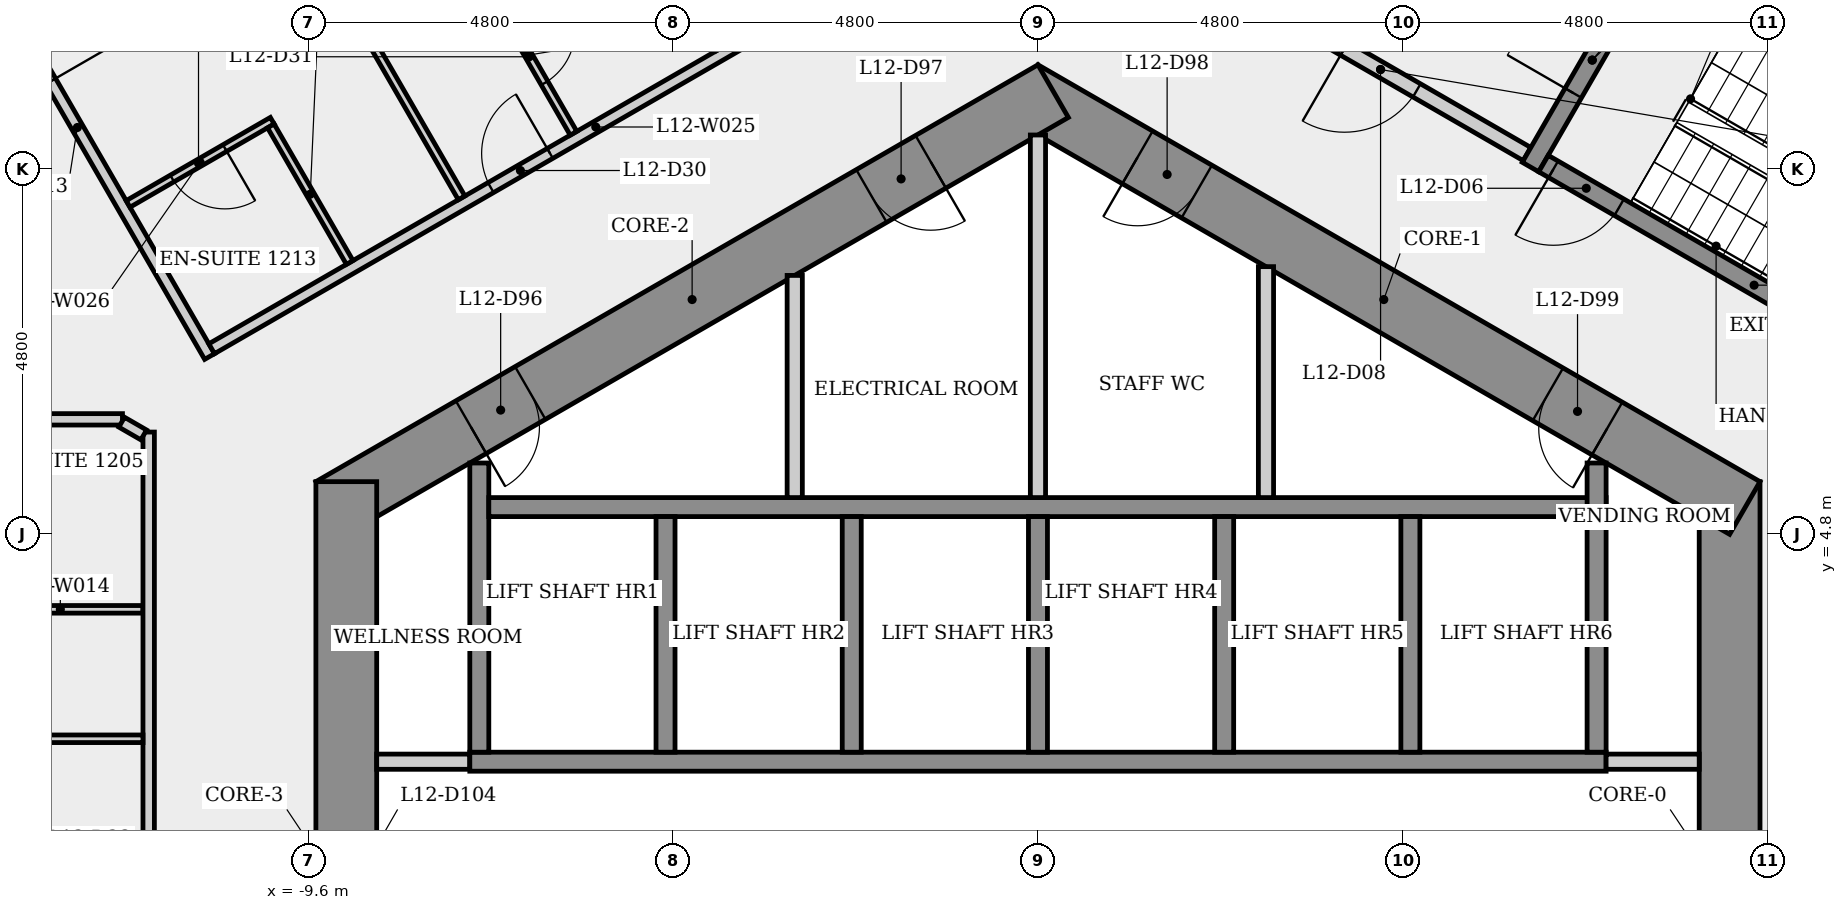
"""IFC4 building model, lengths in metres.
Left out: names, types, materials, properties, quantities, classifications, styles, units other than length and angle.
Written with IfcOpenShell. Run it as: python <this file> out.ifc"""

import sys

from ifc_helpers import new_model, si_unit, direction, frame, frame_2d, origin, place, context, subcontext, project, spatial, rectangle, extrude, element, fill, save


model = new_model("IFC4")
c1 = context("Model", 3, precision=1e-05, world=origin(), true_north=direction((0.0, 1.0)))
c2 = subcontext(c1, "Body", "Model", "MODEL_VIEW")
j1 = project(units=[si_unit("LENGTHUNIT", "METRE"), si_unit("PLANEANGLEUNIT", "RADIAN")], contexts=[c1])
p1 = place(None, origin())
s1 = spatial("IfcSite", under=j1, at=p1, CompositionType="ELEMENT")
p2 = place(p1, origin())
s2 = spatial("IfcBuilding", under=s1, at=p2, CompositionType="ELEMENT")
p3 = place(p2, frame((0.0, 0.0, 49.3)))
s3 = spatial("IfcBuildingStorey", under=s2, at=p3, CompositionType="ELEMENT", Elevation=49.3)
p4 = place(p3, frame((9.1, -5.485, 0.0), z_axis=(0.0, 0.0, 1.0), x_axis=(0.0, 1.0, 0.0)))
e1 = element("IfcWall", 1, at=p4, inside=s3, PredefinedType="SHEAR", context=c2, shape_type="SweptSolid", body=[
    extrude(rectangle(XDim=10.97, YDim=0.8, at=frame_2d((5.485, 0.0))), origin(), (0.0, 0.0, 1.0), 3.4),
])
p5 = place(p4, frame((4.685, 0.0, 0.0)))
e2 = element("IfcOpeningElement", 2, at=p5, cuts=e1, PredefinedType="OPENING", context=c2, shape_type="SweptSolid", body=[
    extrude(rectangle(XDim=1.6, YDim=2.1, at=frame_2d((0.8, 1.05))), frame((0.0, 0.41, 0.0), z_axis=(0.0, -1.0, 0.0), x_axis=(1.0, 0.0, 0.0)), (0.0, 0.0, 1.0), 0.82),
])
p6 = place(p3, frame((9.3, 5.138, 0.0), z_axis=(0.0, 0.0, 1.0), x_axis=(-0.866023993627, 0.500002442456, 0.0)))
e3 = element("IfcWall", 3, at=p6, inside=s3, PredefinedType="SHEAR", context=c2, shape_type="SweptSolid", body=[
    extrude(rectangle(XDim=10.97, YDim=0.8, at=frame_2d((5.485, 0.0))), origin(), (0.0, 0.0, 1.0), 3.4),
])
p7 = place(p6, frame((8.326, 0.0, 0.0)))
e4 = element("IfcOpeningElement", 4, at=p7, cuts=e3, PredefinedType="OPENING", context=c2, shape_type="SweptSolid", body=[
    extrude(rectangle(XDim=0.9, YDim=2.1, at=frame_2d((0.45, 1.05))), frame((0.0, 0.41, 0.0), z_axis=(0.0, -1.0, 0.0), x_axis=(1.0, 0.0, 0.0)), (0.0, 0.0, 1.0), 0.82),
])
p8 = place(p6, frame((2.091, 0.0, 0.0)))
e5 = element("IfcOpeningElement", 5, at=p8, cuts=e3, PredefinedType="OPENING", context=c2, shape_type="SweptSolid", body=[
    extrude(rectangle(XDim=0.9, YDim=2.1, at=frame_2d((0.45, 1.05))), frame((0.0, 0.41, 0.0), z_axis=(0.0, -1.0, 0.0), x_axis=(1.0, 0.0, 0.0)), (0.0, 0.0, 1.0), 0.82),
])
p9 = place(p3, frame((0.2, 10.623, 0.0), z_axis=(0.0, 0.0, 1.0), x_axis=(-0.866023993627, -0.500002442456, 0.0)))
e6 = element("IfcWall", 6, at=p9, inside=s3, PredefinedType="SHEAR", context=c2, shape_type="SweptSolid", body=[
    extrude(rectangle(XDim=10.97, YDim=0.8, at=frame_2d((5.485, 0.0))), origin(), (0.0, 0.0, 1.0), 3.4),
])
p10 = place(p9, frame((7.944, 0.0, 0.0)))
e7 = element("IfcOpeningElement", 7, at=p10, cuts=e6, PredefinedType="OPENING", context=c2, shape_type="SweptSolid", body=[
    extrude(rectangle(XDim=0.9, YDim=2.1, at=frame_2d((0.45, 1.05))), frame((0.0, 0.41, 0.0), z_axis=(0.0, -1.0, 0.0), x_axis=(1.0, 0.0, 0.0)), (0.0, 0.0, 1.0), 0.82),
])
p11 = place(p9, frame((1.86, 0.0, 0.0)))
e8 = element("IfcOpeningElement", 8, at=p11, cuts=e6, PredefinedType="OPENING", context=c2, shape_type="SweptSolid", body=[
    extrude(rectangle(XDim=0.9, YDim=2.1, at=frame_2d((0.45, 1.05))), frame((0.0, 0.41, 0.0), z_axis=(0.0, -1.0, 0.0), x_axis=(1.0, 0.0, 0.0)), (0.0, 0.0, 1.0), 0.82),
])
p12 = place(p3, frame((-9.1, 5.485, 0.0), z_axis=(0.0, 0.0, 1.0), x_axis=(0.0, -1.0, 0.0)))
e9 = element("IfcWall", 9, at=p12, inside=s3, PredefinedType="SHEAR", context=c2, shape_type="SweptSolid", body=[
    extrude(rectangle(XDim=10.97, YDim=0.8, at=frame_2d((5.485, 0.0))), origin(), (0.0, 0.0, 1.0), 3.4),
])
p13 = place(p12, frame((4.685, 0.0, 0.0)))
e10 = element("IfcOpeningElement", 10, at=p13, cuts=e9, PredefinedType="OPENING", context=c2, shape_type="SweptSolid", body=[
    extrude(rectangle(XDim=1.6, YDim=2.1, at=frame_2d((0.8, 1.05))), frame((0.0, 0.41, 0.0), z_axis=(0.0, -1.0, 0.0), x_axis=(1.0, 0.0, 0.0)), (0.0, 0.0, 1.0), 0.82),
])
p14 = place(p3, frame((-14.378, 13.158, 0.0), z_axis=(0.0, 0.0, 1.0), x_axis=(0.499998787219, -0.866026103983, 0.0)))
e11 = element("IfcWall", 11, at=p14, inside=s3, PredefinedType="PARTITIONING", context=c2, shape_type="SweptSolid", body=[
    extrude(rectangle(XDim=6.959, YDim=0.15, at=frame_2d((3.48, 0.0))), origin(), (0.0, 0.0, 1.0), 3.05),
])
p15 = place(p14, frame((1.877, 0.0, 0.0)))
e12 = element("IfcOpeningElement", 12, at=p15, cuts=e11, PredefinedType="OPENING", context=c2, shape_type="SweptSolid", body=[
    extrude(rectangle(XDim=0.9, YDim=2.1, at=frame_2d((0.45, 1.05))), frame((0.0, 0.085, 0.0), z_axis=(0.0, -1.0, 0.0), x_axis=(1.0, 0.0, 0.0)), (0.0, 0.0, 1.0), 0.17),
])
p16 = place(p3, frame((-13.95, 3.805, 0.0), z_axis=(0.0, 0.0, 1.0), x_axis=(1.0, 0.0, 0.0)))
e13 = element("IfcWall", 13, at=p16, inside=s3, PredefinedType="PARTITIONING", context=c2, shape_type="SweptSolid", body=[
    extrude(rectangle(XDim=2.175, YDim=0.1, at=frame_2d((1.087, 0.0))), origin(), (0.0, 0.0, 1.0), 3.05),
])
p17 = place(p3, frame((-18.335, 6.305, 0.0), z_axis=(0.0, 0.0, 1.0), x_axis=(1.0, 0.0, 0.0)))
e14 = element("IfcWall", 14, at=p17, inside=s3, PredefinedType="PARTITIONING", context=c2, shape_type="SweptSolid", body=[
    extrude(rectangle(XDim=6.29, YDim=0.15, at=frame_2d((3.145, 0.0))), origin(), (0.0, 0.0, 1.0), 3.05),
])
p18 = place(p17, frame((1.753, 0.0, 0.0)))
e15 = element("IfcOpeningElement", 15, at=p18, cuts=e14, PredefinedType="OPENING", context=c2, shape_type="SweptSolid", body=[
    extrude(rectangle(XDim=0.9, YDim=2.1, at=frame_2d((0.45, 1.05))), frame((0.0, 0.085, 0.0), z_axis=(0.0, -1.0, 0.0), x_axis=(1.0, 0.0, 0.0)), (0.0, 0.0, 1.0), 0.17),
])
p19 = place(p3, frame((-11.7, 6.137, 0.0), z_axis=(0.0, 0.0, 1.0), x_axis=(0.0, -1.0, 0.0)))
e16 = element("IfcWall", 16, at=p19, inside=s3, PredefinedType="PARTITIONING", context=c2, shape_type="SweptSolid", body=[
    extrude(rectangle(XDim=12.125, YDim=0.15, at=frame_2d((6.062, 0.0))), origin(), (0.0, 0.0, 1.0), 3.05),
])
p20 = place(p19, frame((5.637, 0.0, 0.0)))
e17 = element("IfcOpeningElement", 17, at=p20, cuts=e16, PredefinedType="OPENING", context=c2, shape_type="SweptSolid", body=[
    extrude(rectangle(XDim=1.0, YDim=2.1, at=frame_2d((0.5, 1.05))), frame((0.0, 0.085, 0.0), z_axis=(0.0, -1.0, 0.0), x_axis=(1.0, 0.0, 0.0)), (0.0, 0.0, 1.0), 0.17),
])
p21 = place(p3, frame((-11.775, 2.102, 0.0), z_axis=(0.0, 0.0, 1.0), x_axis=(-1.0, 0.0, 0.0)))
e18 = element("IfcWall", 18, at=p21, inside=s3, PredefinedType="PARTITIONING", context=c2, shape_type="SweptSolid", body=[
    extrude(rectangle(XDim=8.594, YDim=0.1, at=frame_2d((4.297, 0.0))), origin(), (0.0, 0.0, 1.0), 3.05),
])
p22 = place(p3, frame((-11.765, 6.1, 0.0), z_axis=(0.0, 0.0, 1.0), x_axis=(-0.866173457785, 0.499743475223, 0.0)))
e19 = element("IfcWall", 19, at=p22, inside=s3, PredefinedType="PARTITIONING", context=c2, shape_type="SweptSolid", body=[
    extrude(rectangle(XDim=0.335, YDim=0.15, at=frame_2d((0.167, 0.0))), origin(), (0.0, 0.0, 1.0), 3.05),
])
p23 = place(p3, frame((-10.871, 7.233, 0.0), z_axis=(0.0, 0.0, 1.0), x_axis=(0.866013843593, 0.500020022305, 0.0)))
e20 = element("IfcWall", 20, at=p23, inside=s3, PredefinedType="PARTITIONING", context=c2, shape_type="SweptSolid", body=[
    extrude(rectangle(XDim=11.671, YDim=0.15, at=frame_2d((5.835, 0.0))), origin(), (0.0, 0.0, 1.0), 3.05),
])
p24 = place(p23, frame((4.24, 0.0, 0.0)))
e21 = element("IfcOpeningElement", 21, at=p24, cuts=e20, PredefinedType="OPENING", context=c2, shape_type="SweptSolid", body=[
    extrude(rectangle(XDim=0.9, YDim=2.1, at=frame_2d((0.45, 1.05))), frame((0.0, 0.085, 0.0), z_axis=(0.0, -1.0, 0.0), x_axis=(1.0, 0.0, 0.0)), (0.0, 0.0, 1.0), 0.17),
])
p25 = place(p3, frame((-10.074, 10.234, 0.0), z_axis=(0.0, 0.0, 1.0), x_axis=(-0.866074224396, -0.499915430684, 0.0)))
e22 = element("IfcWall", 22, at=p25, inside=s3, PredefinedType="PARTITIONING", context=c2, shape_type="SweptSolid", body=[
    extrude(rectangle(XDim=2.19, YDim=0.1, at=frame_2d((1.095, 0.0))), origin(), (0.0, 0.0, 1.0), 3.05),
])
p26 = place(p25, frame((0.72, 0.0, 0.0)))
e23 = element("IfcOpeningElement", 23, at=p26, cuts=e22, PredefinedType="OPENING", context=c2, shape_type="SweptSolid", body=[
    extrude(rectangle(XDim=0.8, YDim=2.1, at=frame_2d((0.4, 1.05))), frame((0.0, 0.06, 0.0), z_axis=(0.0, -1.0, 0.0), x_axis=(1.0, 0.0, 0.0)), (0.0, 0.0, 1.0), 0.12),
])
p27 = place(p3, frame((-9.055, 8.369, 0.0), z_axis=(0.0, 0.0, 1.0), x_axis=(-0.499973702503, 0.866040586119, 0.0)))
e24 = element("IfcWall", 24, at=p27, inside=s3, PredefinedType="PARTITIONING", context=c2, shape_type="SweptSolid", body=[
    extrude(rectangle(XDim=2.075, YDim=0.1, at=frame_2d((1.037, 0.0))), origin(), (0.0, 0.0, 1.0), 3.05),
])
p28 = place(p3, frame((-8.7, 1.8, 0.0), z_axis=(0.0, 0.0, 1.0), x_axis=(1.0, 0.0, 0.0)))
e25 = element("IfcWall", 25, at=p28, inside=s3, PredefinedType="PARTITIONING", context=c2, shape_type="SweptSolid", body=[
    extrude(rectangle(XDim=1.225, YDim=0.2, at=frame_2d((0.613, 0.0))), origin(), (0.0, 0.0, 1.0), 3.05),
])
p29 = place(p3, frame((-7.583, 9.219, 0.0), z_axis=(0.0, 0.0, 1.0), x_axis=(-0.499977347544, 0.866038481791, 0.0)))
e26 = element("IfcWall", 26, at=p29, inside=s3, PredefinedType="PARTITIONING", context=c2, shape_type="SweptSolid", body=[
    extrude(rectangle(XDim=9.01, YDim=0.1, at=frame_2d((4.505, 0.0))), origin(), (0.0, 0.0, 1.0), 3.05),
])
p30 = place(p3, frame((-7.475, 1.8, 0.0), z_axis=(0.0, 0.0, 1.0), x_axis=(1.0, 0.0, 0.0)))
e27 = element("IfcWall", 27, at=p30, inside=s3, PredefinedType="SHEAR", context=c2, shape_type="SweptSolid", body=[
    extrude(rectangle(XDim=14.95, YDim=0.25, at=frame_2d((7.475, 0.0))), origin(), (0.0, 0.0, 1.0), 3.05),
])
p31 = place(p3, frame((-7.35, 1.925, 0.0), z_axis=(0.0, 0.0, 1.0), x_axis=(0.0, 1.0, 0.0)))
e28 = element("IfcWall", 28, at=p31, inside=s3, PredefinedType="SHEAR", context=c2, shape_type="SweptSolid", body=[
    extrude(rectangle(XDim=3.805, YDim=0.25, at=frame_2d((1.903, 0.0))), origin(), (0.0, 0.0, 1.0), 3.05),
])
p32 = place(p3, frame((-7.225, 5.15, 0.0), z_axis=(0.0, 0.0, 1.0), x_axis=(1.0, 0.0, 0.0)))
e29 = element("IfcWall", 29, at=p32, inside=s3, PredefinedType="SHEAR", context=c2, shape_type="SweptSolid", body=[
    extrude(rectangle(XDim=14.7, YDim=0.25, at=frame_2d((7.35, 0.0))), origin(), (0.0, 0.0, 1.0), 3.05),
])
p33 = place(p3, frame((-7.298, 12.125, 0.0), z_axis=(0.0, 0.0, 1.0), x_axis=(0.499986429846, -0.866033238375, 0.0)))
e30 = element("IfcWall", 30, at=p33, inside=s3, PredefinedType="PARTITIONING", context=c2, shape_type="SweptSolid", body=[
    extrude(rectangle(XDim=2.375, YDim=0.1, at=frame_2d((1.188, 0.0))), origin(), (0.0, 0.0, 1.0), 3.05),
])
p34 = place(p33, frame((0.812, 0.0, 0.0)))
e31 = element("IfcOpeningElement", 31, at=p34, cuts=e30, PredefinedType="OPENING", context=c2, shape_type="SweptSolid", body=[
    extrude(rectangle(XDim=0.8, YDim=2.1, at=frame_2d((0.4, 1.05))), frame((0.0, 0.06, 0.0), z_axis=(0.0, -1.0, 0.0), x_axis=(1.0, 0.0, 0.0)), (0.0, 0.0, 1.0), 0.12),
])
p35 = place(p3, frame((-4.9, 5.025, 0.0), z_axis=(0.0, 0.0, 1.0), x_axis=(0.0, -1.0, 0.0)))
e32 = element("IfcWall", 32, at=p35, inside=s3, PredefinedType="SHEAR", context=c2, shape_type="SweptSolid", body=[
    extrude(rectangle(XDim=3.1, YDim=0.25, at=frame_2d((1.55, 0.0))), origin(), (0.0, 0.0, 1.0), 3.4),
])
p36 = place(p3, frame((-3.2, 8.198, 0.0), z_axis=(0.0, 0.0, 1.0), x_axis=(0.0, -1.0, 0.0)))
e33 = element("IfcWall", 33, at=p36, inside=s3, PredefinedType="PARTITIONING", context=c2, shape_type="SweptSolid", body=[
    extrude(rectangle(XDim=2.924, YDim=0.2, at=frame_2d((1.462, 0.0))), origin(), (0.0, 0.0, 1.0), 3.05),
])
for number, where, z_axis, x_axis in (
    (34, (-2.45, 5.025, 0.0), (0.0, 0.0, 1.0), (0.0, -1.0, 0.0)),
    (35, (0.0, 5.025, 0.0), (0.0, 0.0, 1.0), (0.0, -1.0, 0.0)),
):
    element("IfcWall", number, at=place(p3, frame(where, z_axis=z_axis, x_axis=x_axis)), inside=s3, PredefinedType="SHEAR", context=c2, shape_type="SweptSolid", body=[
        extrude(rectangle(XDim=3.1, YDim=0.25, at=frame_2d((1.55, 0.0))), origin(), (0.0, 0.0, 1.0), 3.4),
    ])
p37 = place(p3, frame((0.0, 10.046, 0.0), z_axis=(0.0, 0.0, 1.0), x_axis=(0.0, -1.0, 0.0)))
e36 = element("IfcWall", 36, at=p37, inside=s3, PredefinedType="PARTITIONING", context=c2, shape_type="SweptSolid", body=[
    extrude(rectangle(XDim=4.771, YDim=0.2, at=frame_2d((2.385, 0.0))), origin(), (0.0, 0.0, 1.0), 3.05),
])
p38 = place(p3, frame((2.45, 5.025, 0.0), z_axis=(0.0, 0.0, 1.0), x_axis=(0.0, -1.0, 0.0)))
e37 = element("IfcWall", 37, at=p38, inside=s3, PredefinedType="SHEAR", context=c2, shape_type="SweptSolid", body=[
    extrude(rectangle(XDim=3.1, YDim=0.25, at=frame_2d((1.55, 0.0))), origin(), (0.0, 0.0, 1.0), 3.4),
])
p39 = place(p3, frame((3.0, 8.314, 0.0), z_axis=(0.0, 0.0, 1.0), x_axis=(0.0, -1.0, 0.0)))
e38 = element("IfcWall", 38, at=p39, inside=s3, PredefinedType="PARTITIONING", context=c2, shape_type="SweptSolid", body=[
    extrude(rectangle(XDim=3.039, YDim=0.2, at=frame_2d((1.52, 0.0))), origin(), (0.0, 0.0, 1.0), 3.05),
])
p40 = place(p3, frame((4.9, 5.025, 0.0), z_axis=(0.0, 0.0, 1.0), x_axis=(0.0, -1.0, 0.0)))
e39 = element("IfcWall", 39, at=p40, inside=s3, PredefinedType="SHEAR", context=c2, shape_type="SweptSolid", body=[
    extrude(rectangle(XDim=3.1, YDim=0.25, at=frame_2d((1.55, 0.0))), origin(), (0.0, 0.0, 1.0), 3.4),
])
p41 = place(p3, frame((6.435, 9.795, 0.0), z_axis=(0.0, 0.0, 1.0), x_axis=(-0.866012907634, 0.500021643343, 0.0)))
e40 = element("IfcWall", 40, at=p41, inside=s3, PredefinedType="PARTITIONING", context=c2, shape_type="SweptSolid", body=[
    extrude(rectangle(XDim=4.45, YDim=0.2, at=frame_2d((2.225, 0.0))), origin(), (0.0, 0.0, 1.0), 3.05),
])
p42 = place(p41, frame((1.675, 0.0, 0.0)))
e41 = element("IfcOpeningElement", 41, at=p42, cuts=e40, PredefinedType="OPENING", context=c2, shape_type="SweptSolid", body=[
    extrude(rectangle(XDim=1.1, YDim=2.1, at=frame_2d((0.55, 1.05))), frame((0.0, 0.11, 0.0), z_axis=(0.0, -1.0, 0.0), x_axis=(1.0, 0.0, 0.0)), (0.0, 0.0, 1.0), 0.22),
])
p43 = place(p3, frame((6.48, 9.624, 0.0), z_axis=(0.0, 0.0, 1.0), x_axis=(0.500017246033, 0.866015446554, 0.0)))
e42 = element("IfcWall", 42, at=p43, inside=s3, PredefinedType="SHEAR", context=c2, shape_type="SweptSolid", body=[
    extrude(rectangle(XDim=3.25, YDim=0.25, at=frame_2d((1.625, 0.0))), origin(), (0.0, 0.0, 1.0), 3.05),
])
p44 = place(p43, frame((1.125, 0.0, 0.0)))
e43 = element("IfcOpeningElement", 43, at=p44, cuts=e42, PredefinedType="OPENING", context=c2, shape_type="SweptSolid", body=[
    extrude(rectangle(XDim=1.0, YDim=2.1, at=frame_2d((0.5, 1.05))), frame((0.0, 0.135, 0.0), z_axis=(0.0, -1.0, 0.0), x_axis=(1.0, 0.0, 0.0)), (0.0, 0.0, 1.0), 0.27),
])
p45 = place(p3, frame((7.475, 1.8, 0.0), z_axis=(0.0, 0.0, 1.0), x_axis=(1.0, 0.0, 0.0)))
e44 = element("IfcWall", 44, at=p45, inside=s3, PredefinedType="PARTITIONING", context=c2, shape_type="SweptSolid", body=[
    extrude(rectangle(XDim=1.225, YDim=0.2, at=frame_2d((0.613, 0.0))), origin(), (0.0, 0.0, 1.0), 3.05),
])
p46 = place(p3, frame((7.35, 5.73, 0.0), z_axis=(0.0, 0.0, 1.0), x_axis=(0.0, -1.0, 0.0)))
e45 = element("IfcWall", 45, at=p46, inside=s3, PredefinedType="SHEAR", context=c2, shape_type="SweptSolid", body=[
    extrude(rectangle(XDim=3.805, YDim=0.25, at=frame_2d((1.903, 0.0))), origin(), (0.0, 0.0, 1.0), 3.05),
])
p47 = place(p3, frame((8.151, 12.268, 0.0), z_axis=(0.0, 0.0, 1.0), x_axis=(0.866025499775, -0.499999833739, 0.0)))
e46 = element("IfcWall", 46, at=p47, inside=s3, PredefinedType="SHEAR", context=c2, shape_type="SweptSolid", body=[
    extrude(rectangle(XDim=6.4, YDim=0.25, at=frame_2d((3.2, 0.0))), origin(), (0.0, 0.0, 1.0), 3.05),
])
p48 = place(p3, frame((12.194, 6.47, 0.0), z_axis=(0.0, 0.0, 1.0), x_axis=(-0.866025499775, 0.499999833739, 0.0)))
e47 = element("IfcWall", 47, at=p48, inside=s3, PredefinedType="SHEAR", context=c2, shape_type="SweptSolid", body=[
    extrude(rectangle(XDim=6.4, YDim=0.25, at=frame_2d((3.2, 0.0))), origin(), (0.0, 0.0, 1.0), 3.05),
])
p49 = place(p48, frame((5.25, 0.0, 0.0)))
e48 = element("IfcOpeningElement", 48, at=p49, cuts=e47, PredefinedType="OPENING", context=c2, shape_type="SweptSolid", body=[
    extrude(rectangle(XDim=1.0, YDim=2.1, at=frame_2d((0.5, 1.05))), frame((0.0, 0.135, 0.0), z_axis=(0.0, -1.0, 0.0), x_axis=(1.0, 0.0, 0.0)), (0.0, 0.0, 1.0), 0.27),
])
p50 = place(p49, origin())
e49 = element("IfcDoor", 49, at=p50, inside=s3, OperationType="SINGLE_SWING_RIGHT", PredefinedType="DOOR", context=c2, shape_type="SweptSolid", body=[
    extrude(rectangle(XDim=1.0, YDim=2.1, at=frame_2d((0.5, 1.05))), frame((0.0, 0.025, 0.0), z_axis=(0.0, -1.0, 0.0), x_axis=(1.0, 0.0, 0.0)), (0.0, 0.0, 1.0), 0.05),
])
fill(e48, e49)
p51 = place(p44, origin())
e50 = element("IfcDoor", 50, at=p51, inside=s3, OperationType="SINGLE_SWING_LEFT", PredefinedType="DOOR", context=c2, shape_type="SweptSolid", body=[
    extrude(rectangle(XDim=1.0, YDim=2.1, at=frame_2d((0.5, 1.05))), frame((0.0, 0.025, 0.0), z_axis=(0.0, -1.0, 0.0), x_axis=(1.0, 0.0, 0.0)), (0.0, 0.0, 1.0), 0.05),
])
fill(e43, e50)
p52 = place(p42, origin())
e51 = element("IfcDoor", 51, at=p52, inside=s3, OperationType="SINGLE_SWING_RIGHT", PredefinedType="DOOR", context=c2, shape_type="SweptSolid", body=[
    extrude(rectangle(XDim=1.1, YDim=2.1, at=frame_2d((0.55, 1.05))), frame((0.0, 0.025, 0.0), z_axis=(0.0, -1.0, 0.0), x_axis=(1.0, 0.0, 0.0)), (0.0, 0.0, 1.0), 0.05),
])
fill(e41, e51)
p53 = place(p24, origin())
e52 = element("IfcDoor", 52, at=p53, inside=s3, OperationType="SINGLE_SWING_RIGHT", PredefinedType="DOOR", context=c2, shape_type="SweptSolid", body=[
    extrude(rectangle(XDim=0.9, YDim=2.1, at=frame_2d((0.45, 1.05))), frame((0.0, 0.025, 0.0), z_axis=(0.0, -1.0, 0.0), x_axis=(1.0, 0.0, 0.0)), (0.0, 0.0, 1.0), 0.05),
])
fill(e21, e52)
p54 = place(p34, origin())
e53 = element("IfcDoor", 53, at=p54, inside=s3, OperationType="SINGLE_SWING_LEFT", PredefinedType="DOOR", context=c2, shape_type="SweptSolid", body=[
    extrude(rectangle(XDim=0.8, YDim=2.1, at=frame_2d((0.4, 1.05))), frame((0.0, 0.025, 0.0), z_axis=(0.0, -1.0, 0.0), x_axis=(1.0, 0.0, 0.0)), (0.0, 0.0, 1.0), 0.05),
])
fill(e31, e53)
p55 = place(p26, origin())
e54 = element("IfcDoor", 54, at=p55, inside=s3, OperationType="SINGLE_SWING_LEFT", PredefinedType="DOOR", context=c2, shape_type="SweptSolid", body=[
    extrude(rectangle(XDim=0.8, YDim=2.1, at=frame_2d((0.4, 1.05))), frame((0.0, 0.025, 0.0), z_axis=(0.0, -1.0, 0.0), x_axis=(1.0, 0.0, 0.0)), (0.0, 0.0, 1.0), 0.05),
])
fill(e23, e54)
p56 = place(p10, origin())
e55 = element("IfcDoor", 55, at=p56, inside=s3, OperationType="SINGLE_SWING_RIGHT", PredefinedType="DOOR", context=c2, shape_type="SweptSolid", body=[
    extrude(rectangle(XDim=0.9, YDim=2.1, at=frame_2d((0.45, 1.05))), frame((0.0, 0.025, 0.0), z_axis=(0.0, -1.0, 0.0), x_axis=(1.0, 0.0, 0.0)), (0.0, 0.0, 1.0), 0.05),
])
fill(e7, e55)
p57 = place(p11, origin())
e56 = element("IfcDoor", 56, at=p57, inside=s3, OperationType="SINGLE_SWING_LEFT", PredefinedType="DOOR", context=c2, shape_type="SweptSolid", body=[
    extrude(rectangle(XDim=0.9, YDim=2.1, at=frame_2d((0.45, 1.05))), frame((0.0, 0.025, 0.0), z_axis=(0.0, -1.0, 0.0), x_axis=(1.0, 0.0, 0.0)), (0.0, 0.0, 1.0), 0.05),
])
fill(e8, e56)
p58 = place(p7, origin())
e57 = element("IfcDoor", 57, at=p58, inside=s3, OperationType="SINGLE_SWING_RIGHT", PredefinedType="DOOR", context=c2, shape_type="SweptSolid", body=[
    extrude(rectangle(XDim=0.9, YDim=2.1, at=frame_2d((0.45, 1.05))), frame((0.0, 0.025, 0.0), z_axis=(0.0, -1.0, 0.0), x_axis=(1.0, 0.0, 0.0)), (0.0, 0.0, 1.0), 0.05),
])
fill(e4, e57)
p59 = place(p8, origin())
e58 = element("IfcDoor", 58, at=p59, inside=s3, OperationType="SINGLE_SWING_LEFT", PredefinedType="DOOR", context=c2, shape_type="SweptSolid", body=[
    extrude(rectangle(XDim=0.9, YDim=2.1, at=frame_2d((0.45, 1.05))), frame((0.0, 0.025, 0.0), z_axis=(0.0, -1.0, 0.0), x_axis=(1.0, 0.0, 0.0)), (0.0, 0.0, 1.0), 0.05),
])
fill(e5, e58)
save(model, sys.argv[1])
